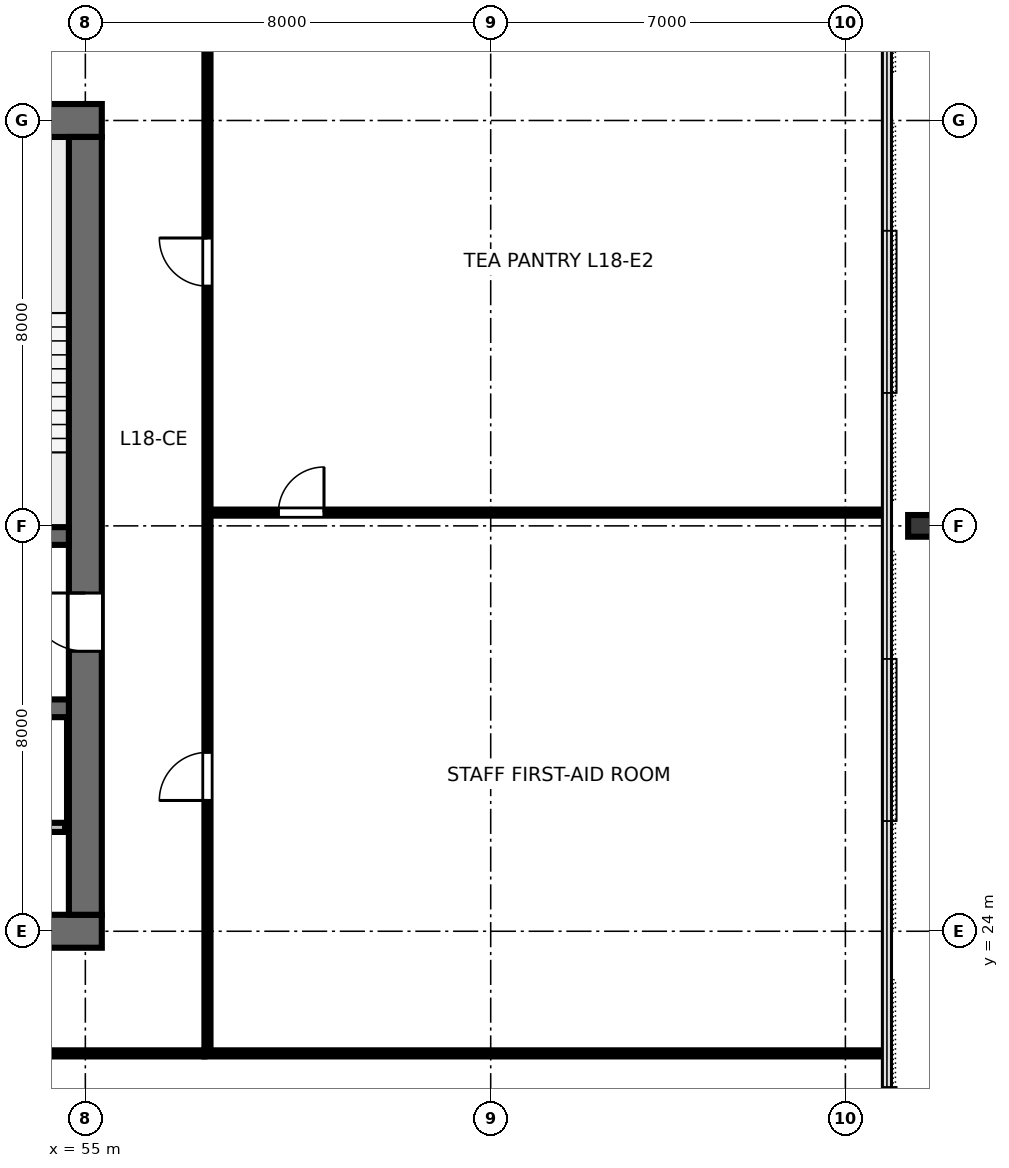
"""IFC4 building model, lengths in metres.
Left out: names, types, materials, properties, quantities, classifications, styles, units other than length and angle.
Written with IfcOpenShell. Run it as: python <this file> out.ifc"""

import sys

from ifc_helpers import new_model, si_unit, direction, frame, frame_2d, origin, origin_2d, place, context, subcontext, project, spatial, rectangle, i_section, extrude, element, fill, save


model = new_model("IFC4")
c1 = context("Model", 3, precision=1e-05, world=origin(), true_north=direction((0.0, 1.0)))
c2 = subcontext(c1, "Body", "Model", "MODEL_VIEW")
j1 = project(units=[si_unit("LENGTHUNIT", "METRE"), si_unit("PLANEANGLEUNIT", "RADIAN")], contexts=[c1])
p1 = place(None, origin())
s1 = spatial("IfcSite", under=j1, at=p1, CompositionType="ELEMENT")
p2 = place(p1, origin())
s2 = spatial("IfcBuilding", under=s1, at=p2, CompositionType="ELEMENT")
p3 = place(p2, frame((0.0, 0.0, 71.2)))
s3 = spatial("IfcBuildingStorey", under=s2, at=p3, CompositionType="ELEMENT", Elevation=71.2)
p4 = place(p3, frame((36.675, 24.0, 0.0), z_axis=(0.0, 0.0, 1.0), x_axis=(1.0, 0.0, 0.0)))
e1 = element("IfcWall", 1, at=p4, inside=s3, PredefinedType="SHEAR", context=c2, shape_type="SweptSolid", body=[
    extrude(rectangle(XDim=18.65, YDim=0.65, at=frame_2d((9.325, 0.0))), origin(), (0.0, 0.0, 1.0), 3.36),
])
p5 = place(p4, frame((5.725, 0.0, 0.0)))
e2 = element("IfcOpeningElement", 2, at=p5, cuts=e1, PredefinedType="OPENING", context=c2, shape_type="SweptSolid", body=[
    extrude(rectangle(XDim=1.6, YDim=2.15, at=frame_2d((0.8, 1.075))), frame((0.0, 0.335, 0.0), z_axis=(0.0, -1.0, 0.0), x_axis=(1.0, 0.0, 0.0)), (0.0, 0.0, 1.0), 0.67),
])
p6 = place(p4, frame((12.125, 0.0, 0.0)))
e3 = element("IfcOpeningElement", 3, at=p6, cuts=e1, PredefinedType="OPENING", context=c2, shape_type="SweptSolid", body=[
    extrude(rectangle(XDim=1.6, YDim=2.15, at=frame_2d((0.8, 1.075))), frame((0.0, 0.335, 0.0), z_axis=(0.0, -1.0, 0.0), x_axis=(1.0, 0.0, 0.0)), (0.0, 0.0, 1.0), 0.67),
])
p7 = place(p3, frame((36.675, 40.0, 0.0), z_axis=(0.0, 0.0, 1.0), x_axis=(1.0, 0.0, 0.0)))
e4 = element("IfcWall", 4, at=p7, inside=s3, PredefinedType="SHEAR", context=c2, shape_type="SweptSolid", body=[
    extrude(rectangle(XDim=18.65, YDim=0.65, at=frame_2d((9.325, 0.0))), origin(), (0.0, 0.0, 1.0), 3.36),
])
p8 = place(p7, frame((8.825, 0.0, 0.0)))
e5 = element("IfcOpeningElement", 5, at=p8, cuts=e4, PredefinedType="OPENING", context=c2, shape_type="SweptSolid", body=[
    extrude(rectangle(XDim=1.0, YDim=2.15, at=frame_2d((0.5, 1.075))), frame((0.0, 0.335, 0.0), z_axis=(0.0, -1.0, 0.0), x_axis=(1.0, 0.0, 0.0)), (0.0, 0.0, 1.0), 0.67),
])
p9 = place(p3, frame((55.0, 24.325, 0.0), z_axis=(0.0, 0.0, 1.0), x_axis=(0.0, 1.0, 0.0)))
e6 = element("IfcWall", 6, at=p9, inside=s3, PredefinedType="SHEAR", context=c2, shape_type="SweptSolid", body=[
    extrude(rectangle(XDim=15.35, YDim=0.65, at=frame_2d((7.675, 0.0))), origin(), (0.0, 0.0, 1.0), 3.36),
])
p10 = place(p9, frame((5.2, 0.0, 0.0)))
e7 = element("IfcOpeningElement", 7, at=p10, cuts=e6, PredefinedType="OPENING", context=c2, shape_type="SweptSolid", body=[
    extrude(rectangle(XDim=1.15, YDim=2.15, at=frame_2d((0.575, 1.075))), frame((0.0, 0.335, 0.0), z_axis=(0.0, -1.0, 0.0), x_axis=(1.0, 0.0, 0.0)), (0.0, 0.0, 1.0), 0.67),
])
p11 = place(p3, frame((37.325, 31.8, 0.0), z_axis=(0.0, 0.0, 1.0), x_axis=(1.0, 0.0, 0.0)))
e8 = element("IfcWall", 8, at=p11, inside=s3, PredefinedType="SHEAR", context=c2, shape_type="SweptSolid", body=[
    extrude(rectangle(XDim=17.35, YDim=0.35, at=frame_2d((8.675, 0.0))), origin(), (0.0, 0.0, 1.0), 3.36),
])
p12 = place(p11, frame((0.725, 0.0, 0.0)))
e9 = element("IfcOpeningElement", 9, at=p12, cuts=e8, PredefinedType="OPENING", context=c2, shape_type="SweptSolid", body=[
    extrude(rectangle(XDim=1.1, YDim=2.15, at=frame_2d((0.55, 1.075))), frame((0.0, 0.185, 0.0), z_axis=(0.0, -1.0, 0.0), x_axis=(1.0, 0.0, 0.0)), (0.0, 0.0, 1.0), 0.37),
])
p13 = place(p11, frame((14.625, 0.0, 0.0)))
e10 = element("IfcOpeningElement", 10, at=p13, cuts=e8, PredefinedType="OPENING", context=c2, shape_type="SweptSolid", body=[
    extrude(rectangle(XDim=1.1, YDim=2.15, at=frame_2d((0.55, 1.075))), frame((0.0, 0.185, 0.0), z_axis=(0.0, -1.0, 0.0), x_axis=(1.0, 0.0, 0.0)), (0.0, 0.0, 1.0), 0.37),
])
p14 = place(p3, frame((37.325, 28.4, 0.0), z_axis=(0.0, 0.0, 1.0), x_axis=(1.0, 0.0, 0.0)))
e11 = element("IfcWall", 11, at=p14, inside=s3, PredefinedType="SHEAR", context=c2, shape_type="SweptSolid", body=[
    extrude(rectangle(XDim=17.35, YDim=0.35, at=frame_2d((8.675, 0.0))), origin(), (0.0, 0.0, 1.0), 3.36),
])
p15 = place(p3, frame((71.48, 32.0, 0.0), z_axis=(0.0, 0.0, 1.0), x_axis=(0.0, 1.0, 0.0)))
e12 = element("IfcColumn", 12, at=p15, inside=s3, PredefinedType="COLUMN", context=c2, shape_type="SweptSolid", body=[
    extrude(i_section(OverallWidth=0.428, OverallDepth=0.483, WebThickness=0.051, FlangeThickness=0.082, FilletRadius=0.025, at=origin_2d()), origin(), (0.0, 0.0, 1.0), 3.358),
])
p16 = place(p3, frame((37.4, 26.05, 0.0), z_axis=(0.0, 0.0, 1.0), x_axis=(1.0, 0.0, 0.0)))
e13 = element("IfcWall", 13, at=p16, inside=s3, PredefinedType="PARTITIONING", context=c2, shape_type="SweptSolid", body=[
    extrude(rectangle(XDim=17.2, YDim=0.18, at=frame_2d((8.6, 0.0))), origin(), (0.0, 0.0, 1.0), 3.36),
])
p17 = place(p16, frame((1.1, 0.0, 0.0)))
e14 = element("IfcOpeningElement", 14, at=p17, cuts=e13, PredefinedType="OPENING", context=c2, shape_type="SweptSolid", body=[
    extrude(rectangle(XDim=1.05, YDim=2.15, at=frame_2d((0.525, 1.075))), frame((0.0, 0.1, 0.0), z_axis=(0.0, -1.0, 0.0), x_axis=(1.0, 0.0, 0.0)), (0.0, 0.0, 1.0), 0.2),
])
p18 = place(p16, frame((3.0, 0.0, 0.0)))
e15 = element("IfcOpeningElement", 15, at=p18, cuts=e13, PredefinedType="OPENING", context=c2, shape_type="SweptSolid", body=[
    extrude(rectangle(XDim=1.05, YDim=2.15, at=frame_2d((0.525, 1.075))), frame((0.0, 0.1, 0.0), z_axis=(0.0, -1.0, 0.0), x_axis=(1.0, 0.0, 0.0)), (0.0, 0.0, 1.0), 0.2),
])
p19 = place(p3, frame((34.65, 21.59, 0.0), z_axis=(0.0, 0.0, 1.0), x_axis=(1.0, 0.0, 0.0)))
e16 = element("IfcWall", 16, at=p19, inside=s3, PredefinedType="PARTITIONING", context=c2, shape_type="SweptSolid", body=[
    extrude(rectangle(XDim=22.7, YDim=0.12, at=frame_2d((11.35, 0.0))), origin(), (0.0, 0.0, 1.0), 2.64),
])
p20 = place(p19, frame((3.463, 0.0, 0.0)))
e17 = element("IfcOpeningElement", 17, at=p20, cuts=e16, PredefinedType="OPENING", context=c2, shape_type="SweptSolid", body=[
    extrude(rectangle(XDim=0.95, YDim=2.15, at=frame_2d((0.475, 1.075))), frame((0.0, 0.07, 0.0), z_axis=(0.0, -1.0, 0.0), x_axis=(1.0, 0.0, 0.0)), (0.0, 0.0, 1.0), 0.14),
])
p21 = place(p19, frame((14.673, 0.0, 0.0)))
e18 = element("IfcOpeningElement", 18, at=p21, cuts=e16, PredefinedType="OPENING", context=c2, shape_type="SweptSolid", body=[
    extrude(rectangle(XDim=0.95, YDim=2.15, at=frame_2d((0.475, 1.075))), frame((0.0, 0.07, 0.0), z_axis=(0.0, -1.0, 0.0), x_axis=(1.0, 0.0, 0.0)), (0.0, 0.0, 1.0), 0.14),
])
p22 = place(p3, frame((57.41, 32.262, 0.0), z_axis=(0.0, 0.0, 1.0), x_axis=(1.0, 0.0, 0.0)))
e19 = element("IfcWall", 19, at=p22, inside=s3, PredefinedType="PARTITIONING", context=c2, shape_type="SweptSolid", body=[
    extrude(rectangle(XDim=13.41, YDim=0.12, at=frame_2d((6.705, 0.0))), origin(), (0.0, 0.0, 1.0), 2.64),
])
p23 = place(p22, frame((1.4, 0.0, 0.0)))
e20 = element("IfcOpeningElement", 20, at=p23, cuts=e19, PredefinedType="OPENING", context=c2, shape_type="SweptSolid", body=[
    extrude(rectangle(XDim=0.9, YDim=2.15, at=frame_2d((0.45, 1.075))), frame((0.0, 0.07, 0.0), z_axis=(0.0, -1.0, 0.0), x_axis=(1.0, 0.0, 0.0)), (0.0, 0.0, 1.0), 0.14),
])
p24 = place(p3, frame((57.41, 21.65, 0.0), z_axis=(0.0, 0.0, 1.0), x_axis=(0.0, 1.0, 0.0)))
e21 = element("IfcWall", 21, at=p24, inside=s3, PredefinedType="PARTITIONING", context=c2, shape_type="SweptSolid", body=[
    extrude(rectangle(XDim=20.7, YDim=0.12, at=frame_2d((10.35, 0.0))), origin(), (0.0, 0.0, 1.0), 2.64),
])
p25 = place(p24, frame((4.931, 0.0, 0.0)))
e22 = element("IfcOpeningElement", 22, at=p25, cuts=e21, PredefinedType="OPENING", context=c2, shape_type="SweptSolid", body=[
    extrude(rectangle(XDim=0.95, YDim=2.15, at=frame_2d((0.475, 1.075))), frame((0.0, 0.07, 0.0), z_axis=(0.0, -1.0, 0.0), x_axis=(1.0, 0.0, 0.0)), (0.0, 0.0, 1.0), 0.14),
])
p26 = place(p24, frame((15.081, 0.0, 0.0)))
e23 = element("IfcOpeningElement", 23, at=p26, cuts=e21, PredefinedType="OPENING", context=c2, shape_type="SweptSolid", body=[
    extrude(rectangle(XDim=0.95, YDim=2.15, at=frame_2d((0.475, 1.075))), frame((0.0, 0.07, 0.0), z_axis=(0.0, -1.0, 0.0), x_axis=(1.0, 0.0, 0.0)), (0.0, 0.0, 1.0), 0.14),
])
p27 = place(p3, frame((57.35, 21.59, 0.0), z_axis=(0.0, 0.0, 1.0), x_axis=(1.0, 0.0, 0.0)))
e24 = element("IfcWall", 24, at=p27, inside=s3, PredefinedType="PARTITIONING", context=c2, shape_type="SweptSolid", body=[
    extrude(rectangle(XDim=13.47, YDim=0.12, at=frame_2d((6.735, 0.0))), origin(), (0.0, 0.0, 1.0), 2.64),
])
p28 = place(p10, origin())
e25 = element("IfcDoor", 25, at=p28, inside=s3, OperationType="SINGLE_SWING_RIGHT", PredefinedType="DOOR", context=c2, shape_type="SweptSolid", body=[
    extrude(rectangle(XDim=1.15, YDim=2.15, at=frame_2d((0.575, 1.075))), frame((0.0, 0.025, 0.0), z_axis=(0.0, -1.0, 0.0), x_axis=(1.0, 0.0, 0.0)), (0.0, 0.0, 1.0), 0.05),
])
fill(e7, e25)
p29 = place(p23, origin())
e26 = element("IfcDoor", 26, at=p29, inside=s3, OperationType="SINGLE_SWING_RIGHT", PredefinedType="DOOR", context=c2, shape_type="SweptSolid", body=[
    extrude(rectangle(XDim=0.9, YDim=2.15, at=frame_2d((0.45, 1.075))), frame((0.0, 0.025, 0.0), z_axis=(0.0, -1.0, 0.0), x_axis=(1.0, 0.0, 0.0)), (0.0, 0.0, 1.0), 0.05),
])
fill(e20, e26)
p30 = place(p25, origin())
e27 = element("IfcDoor", 27, at=p30, inside=s3, OperationType="SINGLE_SWING_LEFT", PredefinedType="DOOR", context=c2, shape_type="SweptSolid", body=[
    extrude(rectangle(XDim=0.95, YDim=2.15, at=frame_2d((0.475, 1.075))), frame((0.0, 0.025, 0.0), z_axis=(0.0, -1.0, 0.0), x_axis=(1.0, 0.0, 0.0)), (0.0, 0.0, 1.0), 0.05),
])
fill(e22, e27)
p31 = place(p26, origin())
e28 = element("IfcDoor", 28, at=p31, inside=s3, OperationType="SINGLE_SWING_RIGHT", PredefinedType="DOOR", context=c2, shape_type="SweptSolid", body=[
    extrude(rectangle(XDim=0.95, YDim=2.15, at=frame_2d((0.475, 1.075))), frame((0.0, 0.025, 0.0), z_axis=(0.0, -1.0, 0.0), x_axis=(1.0, 0.0, 0.0)), (0.0, 0.0, 1.0), 0.05),
])
fill(e23, e28)
save(model, sys.argv[1])
